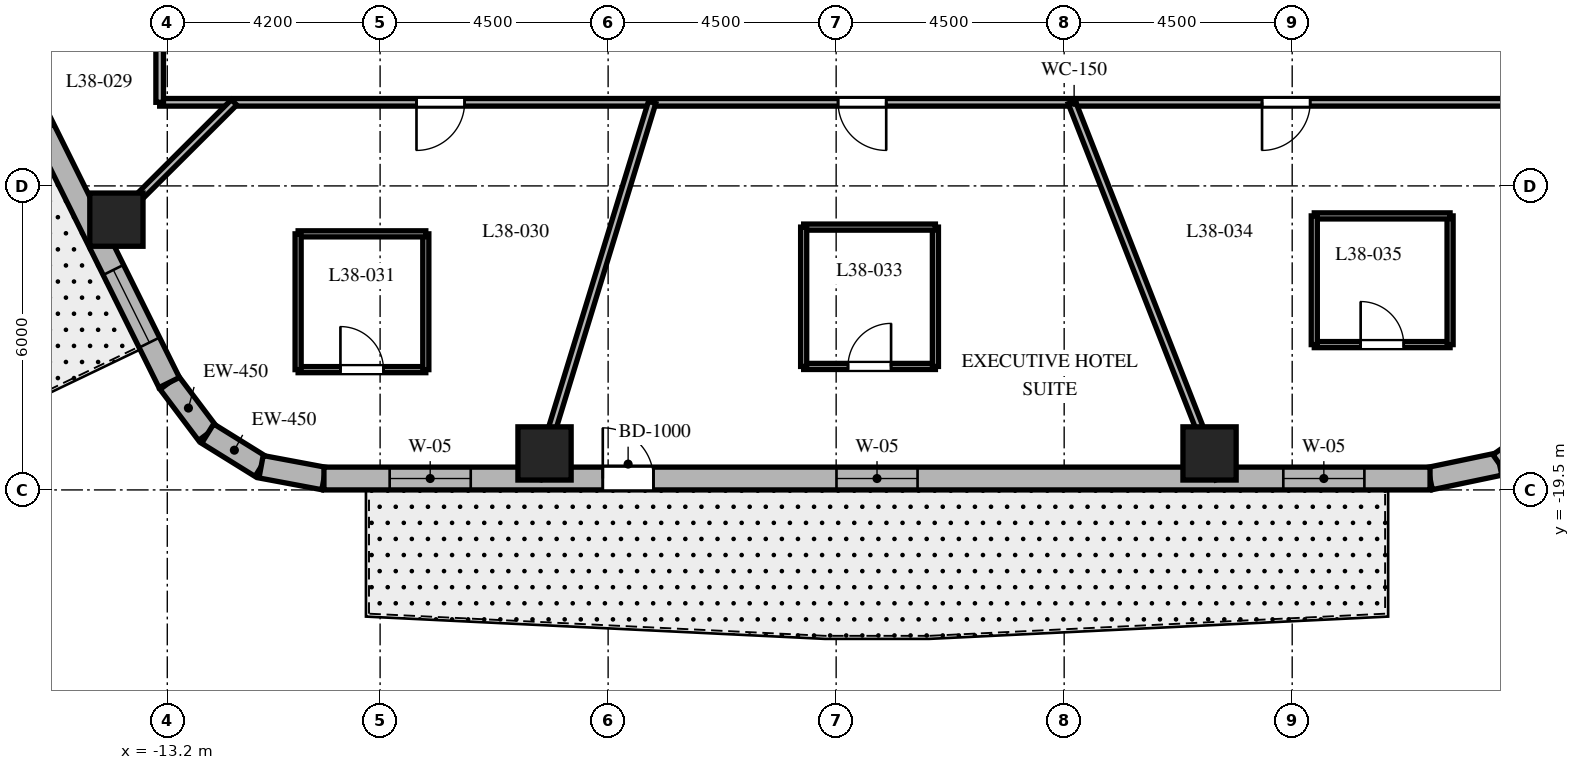
"""IFC4 building model, lengths in metres.
Left out: names, types, materials, properties, quantities, classifications, styles, units other than length and angle.
Written with IfcOpenShell. Run it as: python <this file> out.ifc"""

import sys

from ifc_helpers import new_model, si_unit, direction, frame, frame_2d, origin, origin_2d, place, context, subcontext, project, spatial, rectangle, extrude, element, fill, save


model = new_model("IFC4")
c1 = context("Model", 3, precision=1e-05, world=origin(), true_north=direction((0.0, 1.0)))
c2 = subcontext(c1, "Body", "Model", "MODEL_VIEW")
j1 = project(units=[si_unit("LENGTHUNIT", "METRE"), si_unit("PLANEANGLEUNIT", "RADIAN")], contexts=[c1])
p1 = place(None, origin())
s1 = spatial("IfcSite", under=j1, at=p1, CompositionType="ELEMENT")
p2 = place(p1, origin())
s2 = spatial("IfcBuilding", under=s1, at=p2, CompositionType="ELEMENT")
p3 = place(p2, frame((0.0, 0.0, 155.4)))
s3 = spatial("IfcBuildingStorey", under=s2, at=p3, CompositionType="ELEMENT", Elevation=155.4)
for number, where, z_axis, x_axis in (
    (1, (-5.755, -18.78, 0.0), (0.0, 0.0, 1.0), (1.0, 0.0, 0.0)),
    (2, (7.369, -18.78, 0.0), (0.0, 0.0, 1.0), (1.0, 0.0, 0.0)),
    (3, (-14.204, -14.166, 0.0), (0.0, 0.0, 1.0), (1.0, 0.0, 0.0)),
):
    element("IfcColumn", number, at=place(p3, frame(where, z_axis=z_axis, x_axis=x_axis)), inside=s3, PredefinedType="COLUMN", context=c2, shape_type="SweptSolid", body=[
        extrude(rectangle(XDim=1.05, YDim=1.05, at=origin_2d()), origin(), (0.0, 0.0, 1.0), 3.7),
    ])
p4 = place(p3, frame((-13.162, -17.381, 0.0), z_axis=(0.0, 0.0, 1.0), x_axis=(0.601515770517, -0.798860925205, 0.0)))
e4 = element("IfcWall", 4, at=p4, inside=s3, PredefinedType="SOLIDWALL", context=c2, shape_type="SweptSolid", body=[
    extrude(rectangle(XDim=1.262, YDim=0.45, at=frame_2d((0.631, 0.0))), origin(), (0.0, 0.0, 1.0), 3.4),
])
p5 = place(p3, frame((-12.403, -18.389, 0.0), z_axis=(0.0, 0.0, 1.0), x_axis=(0.849795170926, -0.527113049991, 0.0)))
e5 = element("IfcWall", 5, at=p5, inside=s3, PredefinedType="SOLIDWALL", context=c2, shape_type="SweptSolid", body=[
    extrude(rectangle(XDim=1.241, YDim=0.45, at=frame_2d((0.62, 0.0))), origin(), (0.0, 0.0, 1.0), 3.4),
])
p6 = place(p3, frame((-11.349, -19.043, 0.0), z_axis=(0.0, 0.0, 1.0), x_axis=(0.982931267051, -0.183973161772, 0.0)))
e6 = element("IfcWall", 6, at=p6, inside=s3, PredefinedType="SOLIDWALL", context=c2, shape_type="SweptSolid", body=[
    extrude(rectangle(XDim=1.262, YDim=0.45, at=frame_2d((0.631, 0.0))), origin(), (0.0, 0.0, 1.0), 3.4),
])
p7 = place(p3, frame((11.72, -19.275, 0.0), z_axis=(0.0, 0.0, 1.0), x_axis=(0.97893106758, 0.204191001093, 0.0)))
e7 = element("IfcWall", 7, at=p7, inside=s3, PredefinedType="SOLIDWALL", context=c2, shape_type="SweptSolid", body=[
    extrude(rectangle(XDim=1.4, YDim=0.45, at=frame_2d((0.7, 0.0))), origin(), (0.0, 0.0, 1.0), 3.4),
])
p8 = place(p3, frame((13.091, -18.989, 0.0), z_axis=(0.0, 0.0, 1.0), x_axis=(0.815574637848, 0.578651890258, 0.0)))
e8 = element("IfcWall", 8, at=p8, inside=s3, PredefinedType="SOLIDWALL", context=c2, shape_type="SweptSolid", body=[
    extrude(rectangle(XDim=1.377, YDim=0.45, at=frame_2d((0.688, 0.0))), origin(), (0.0, 0.0, 1.0), 3.4),
])
p9 = place(p3, frame((-10.108, -19.275, 0.0), z_axis=(0.0, 0.0, 1.0), x_axis=(1.0, 0.0, 0.0)))
e9 = element("IfcWall", 9, at=p9, inside=s3, PredefinedType="SOLIDWALL", context=c2, shape_type="SweptSolid", body=[
    extrude(rectangle(XDim=21.829, YDim=0.45, at=frame_2d((10.915, 0.0))), origin(), (0.0, 0.0, 1.0), 3.4),
])
p10 = place(p9, frame((5.503, 0.0, 0.0)))
e10 = element("IfcOpeningElement", 10, at=p10, cuts=e9, PredefinedType="OPENING", context=c2, shape_type="SweptSolid", body=[
    extrude(rectangle(XDim=1.0, YDim=2.15, at=frame_2d((0.5, 1.075))), frame((0.0, 0.235, 0.0), z_axis=(0.0, -1.0, 0.0), x_axis=(1.0, 0.0, 0.0)), (0.0, 0.0, 1.0), 0.47),
])
p11 = place(p9, frame((1.297, 0.0, 0.8)))
e11 = element("IfcOpeningElement", 11, at=p11, cuts=e9, PredefinedType="OPENING", context=c2, shape_type="SweptSolid", body=[
    extrude(rectangle(XDim=1.6, YDim=1.75, at=frame_2d((0.8, 0.875))), frame((0.0, 0.235, 0.0), z_axis=(0.0, -1.0, 0.0), x_axis=(1.0, 0.0, 0.0)), (0.0, 0.0, 1.0), 0.47),
])
p12 = place(p9, frame((10.115, 0.0, 0.8)))
e12 = element("IfcOpeningElement", 12, at=p12, cuts=e9, PredefinedType="OPENING", context=c2, shape_type="SweptSolid", body=[
    extrude(rectangle(XDim=1.6, YDim=1.75, at=frame_2d((0.8, 0.875))), frame((0.0, 0.235, 0.0), z_axis=(0.0, -1.0, 0.0), x_axis=(1.0, 0.0, 0.0)), (0.0, 0.0, 1.0), 0.47),
])
p13 = place(p9, frame((18.933, 0.0, 0.8)))
e13 = element("IfcOpeningElement", 13, at=p13, cuts=e9, PredefinedType="OPENING", context=c2, shape_type="SweptSolid", body=[
    extrude(rectangle(XDim=1.6, YDim=1.75, at=frame_2d((0.8, 0.875))), frame((0.0, 0.235, 0.0), z_axis=(0.0, -1.0, 0.0), x_axis=(1.0, 0.0, 0.0)), (0.0, 0.0, 1.0), 0.47),
])
p14 = place(p3, frame((-20.618, -2.344, 0.0), z_axis=(0.0, 0.0, 1.0), x_axis=(0.444243691097, -0.895905990002, 0.0)))
e14 = element("IfcWall", 14, at=p14, inside=s3, PredefinedType="SOLIDWALL", context=c2, shape_type="SweptSolid", body=[
    extrude(rectangle(XDim=16.784, YDim=0.45, at=frame_2d((8.392, 0.0))), origin(), (0.0, 0.0, 1.0), 3.4),
])
p15 = place(p14, frame((4.535, 0.0, 0.0)))
e15 = element("IfcOpeningElement", 15, at=p15, cuts=e14, PredefinedType="OPENING", context=c2, shape_type="SweptSolid", body=[
    extrude(rectangle(XDim=0.95, YDim=2.15, at=frame_2d((0.475, 1.075))), frame((0.0, 0.235, 0.0), z_axis=(0.0, -1.0, 0.0), x_axis=(1.0, 0.0, 0.0)), (0.0, 0.0, 1.0), 0.47),
])
p16 = place(p14, frame((0.931, 0.0, 0.8)))
e16 = element("IfcOpeningElement", 16, at=p16, cuts=e14, PredefinedType="OPENING", context=c2, shape_type="SweptSolid", body=[
    extrude(rectangle(XDim=1.6, YDim=1.75, at=frame_2d((0.8, 0.875))), frame((0.0, 0.235, 0.0), z_axis=(0.0, -1.0, 0.0), x_axis=(1.0, 0.0, 0.0)), (0.0, 0.0, 1.0), 0.47),
])
p17 = place(p14, frame((5.942, 0.0, 0.8)))
e17 = element("IfcOpeningElement", 17, at=p17, cuts=e14, PredefinedType="OPENING", context=c2, shape_type="SweptSolid", body=[
    extrude(rectangle(XDim=1.0, YDim=1.65, at=frame_2d((0.5, 0.825))), frame((0.0, 0.235, 0.0), z_axis=(0.0, -1.0, 0.0), x_axis=(1.0, 0.0, 0.0)), (0.0, 0.0, 1.0), 0.47),
])
p18 = place(p14, frame((9.633, 0.0, 0.8)))
e18 = element("IfcOpeningElement", 18, at=p18, cuts=e14, PredefinedType="OPENING", context=c2, shape_type="SweptSolid", body=[
    extrude(rectangle(XDim=1.6, YDim=1.75, at=frame_2d((0.8, 0.875))), frame((0.0, 0.235, 0.0), z_axis=(0.0, -1.0, 0.0), x_axis=(1.0, 0.0, 0.0)), (0.0, 0.0, 1.0), 0.47),
])
p19 = place(p14, frame((14.303, 0.0, 0.8)))
e19 = element("IfcOpeningElement", 19, at=p19, cuts=e14, PredefinedType="OPENING", context=c2, shape_type="SweptSolid", body=[
    extrude(rectangle(XDim=1.6, YDim=1.75, at=frame_2d((0.8, 0.875))), frame((0.0, 0.235, 0.0), z_axis=(0.0, -1.0, 0.0), x_axis=(1.0, 0.0, 0.0)), (0.0, 0.0, 1.0), 0.47),
])
p20 = place(p3, frame((13.35, -11.85, 0.0), z_axis=(0.0, 0.0, 1.0), x_axis=(-1.0, 0.0, 0.0)))
e20 = element("IfcWall", 20, at=p20, inside=s3, PredefinedType="PARTITIONING", context=c2, shape_type="SweptSolid", body=[
    extrude(rectangle(XDim=26.7, YDim=0.15, at=frame_2d((13.35, 0.0))), origin(), (0.0, 0.0, 1.0), 2.84),
])
p21 = place(p20, frame((20.682, 0.0, 0.0)))
e21 = element("IfcOpeningElement", 21, at=p21, cuts=e20, PredefinedType="OPENING", context=c2, shape_type="SweptSolid", body=[
    extrude(rectangle(XDim=0.95, YDim=2.03, at=frame_2d((0.475, 1.015))), frame((0.0, 0.085, 0.0), z_axis=(0.0, -1.0, 0.0), x_axis=(1.0, 0.0, 0.0)), (0.0, 0.0, 1.0), 0.17),
])
p22 = place(p20, frame((12.362, 0.0, 0.0)))
e22 = element("IfcOpeningElement", 22, at=p22, cuts=e20, PredefinedType="OPENING", context=c2, shape_type="SweptSolid", body=[
    extrude(rectangle(XDim=0.95, YDim=2.03, at=frame_2d((0.475, 1.015))), frame((0.0, 0.085, 0.0), z_axis=(0.0, -1.0, 0.0), x_axis=(1.0, 0.0, 0.0)), (0.0, 0.0, 1.0), 0.17),
])
p23 = place(p20, frame((3.995, 0.0, 0.0)))
e23 = element("IfcOpeningElement", 23, at=p23, cuts=e20, PredefinedType="OPENING", context=c2, shape_type="SweptSolid", body=[
    extrude(rectangle(XDim=0.95, YDim=2.03, at=frame_2d((0.475, 1.015))), frame((0.0, 0.085, 0.0), z_axis=(0.0, -1.0, 0.0), x_axis=(1.0, 0.0, 0.0)), (0.0, 0.0, 1.0), 0.17),
])
p24 = place(p3, frame((-13.35, -11.85, 0.0), z_axis=(0.0, 0.0, 1.0), x_axis=(0.0, 1.0, 0.0)))
e24 = element("IfcWall", 24, at=p24, inside=s3, PredefinedType="PARTITIONING", context=c2, shape_type="SweptSolid", body=[
    extrude(rectangle(XDim=23.7, YDim=0.15, at=frame_2d((11.85, 0.0))), origin(), (0.0, 0.0, 1.0), 2.84),
])
p25 = place(p24, frame((18.389, 0.0, 0.0)))
e25 = element("IfcOpeningElement", 25, at=p25, cuts=e24, PredefinedType="OPENING", context=c2, shape_type="SweptSolid", body=[
    extrude(rectangle(XDim=0.95, YDim=2.03, at=frame_2d((0.475, 1.015))), frame((0.0, 0.085, 0.0), z_axis=(0.0, -1.0, 0.0), x_axis=(1.0, 0.0, 0.0)), (0.0, 0.0, 1.0), 0.17),
])
p26 = place(p24, frame((10.751, 0.0, 0.0)))
e26 = element("IfcOpeningElement", 26, at=p26, cuts=e24, PredefinedType="OPENING", context=c2, shape_type="SweptSolid", body=[
    extrude(rectangle(XDim=0.95, YDim=2.03, at=frame_2d((0.475, 1.015))), frame((0.0, 0.085, 0.0), z_axis=(0.0, -1.0, 0.0), x_axis=(1.0, 0.0, 0.0)), (0.0, 0.0, 1.0), 0.17),
])
p27 = place(p24, frame((5.951, 0.0, 0.0)))
e27 = element("IfcOpeningElement", 27, at=p27, cuts=e24, PredefinedType="OPENING", context=c2, shape_type="SweptSolid", body=[
    extrude(rectangle(XDim=0.9, YDim=2.03, at=frame_2d((0.45, 1.015))), frame((0.0, 0.085, 0.0), z_axis=(0.0, -1.0, 0.0), x_axis=(1.0, 0.0, 0.0)), (0.0, 0.0, 1.0), 0.17),
])
p28 = place(p24, frame((1.993, 0.0, 0.0)))
e28 = element("IfcOpeningElement", 28, at=p28, cuts=e24, PredefinedType="OPENING", context=c2, shape_type="SweptSolid", body=[
    extrude(rectangle(XDim=0.9, YDim=2.03, at=frame_2d((0.45, 1.015))), frame((0.0, 0.085, 0.0), z_axis=(0.0, -1.0, 0.0), x_axis=(1.0, 0.0, 0.0)), (0.0, 0.0, 1.0), 0.17),
])
p29 = place(p3, frame((-11.882, -11.85, 0.0), z_axis=(0.0, 0.0, 1.0), x_axis=(-0.708037373639, -0.706174962407, 0.0)))
e29 = element("IfcWall", 29, at=p29, inside=s3, PredefinedType="PARTITIONING", context=c2, shape_type="SweptSolid", body=[
    extrude(rectangle(XDim=3.802, YDim=0.15, at=frame_2d((1.901, 0.0))), origin(), (0.0, 0.0, 1.0), 2.64),
])
p30 = place(p3, frame((-3.631, -11.85, 0.0), z_axis=(0.0, 0.0, 1.0), x_axis=(-0.293007573338, -0.956110120209, 0.0)))
e30 = element("IfcWall", 30, at=p30, inside=s3, PredefinedType="PARTITIONING", context=c2, shape_type="SweptSolid", body=[
    extrude(rectangle(XDim=7.766, YDim=0.15, at=frame_2d((3.883, 0.0))), origin(), (0.0, 0.0, 1.0), 2.64),
])
p31 = place(p3, frame((4.65, -11.85, 0.0), z_axis=(0.0, 0.0, 1.0), x_axis=(0.365265947993, -0.930903210456, 0.0)))
e31 = element("IfcWall", 31, at=p31, inside=s3, PredefinedType="PARTITIONING", context=c2, shape_type="SweptSolid", body=[
    extrude(rectangle(XDim=7.976, YDim=0.15, at=frame_2d((3.988, 0.0))), origin(), (0.0, 0.0, 1.0), 2.64),
])
p32 = place(p3, frame((-10.618, -17.126, 0.0), z_axis=(0.0, 0.0, 1.0), x_axis=(1.0, 0.0, 0.0)))
e32 = element("IfcWall", 32, at=p32, inside=s3, PredefinedType="PARTITIONING", context=c2, shape_type="SweptSolid", body=[
    extrude(rectangle(XDim=2.52, YDim=0.12, at=frame_2d((1.26, 0.0))), origin(), (0.0, 0.0, 1.0), 2.64),
])
p33 = place(p32, frame((0.835, 0.0, 0.0)))
e33 = element("IfcOpeningElement", 33, at=p33, cuts=e32, PredefinedType="OPENING", context=c2, shape_type="SweptSolid", body=[
    extrude(rectangle(XDim=0.85, YDim=2.03, at=frame_2d((0.425, 1.015))), frame((0.0, 0.07, 0.0), z_axis=(0.0, -1.0, 0.0), x_axis=(1.0, 0.0, 0.0)), (0.0, 0.0, 1.0), 0.14),
])
p34 = place(p3, frame((-8.098, -17.126, 0.0), z_axis=(0.0, 0.0, 1.0), x_axis=(0.0, 1.0, 0.0)))
e34 = element("IfcWall", 34, at=p34, inside=s3, PredefinedType="PARTITIONING", context=c2, shape_type="SweptSolid", body=[
    extrude(rectangle(XDim=2.68, YDim=0.12, at=frame_2d((1.34, 0.0))), origin(), (0.0, 0.0, 1.0), 3.4),
])
p35 = place(p3, frame((-8.098, -14.446, 0.0), z_axis=(0.0, 0.0, 1.0), x_axis=(-1.0, 0.0, 0.0)))
e35 = element("IfcWall", 35, at=p35, inside=s3, PredefinedType="PARTITIONING", context=c2, shape_type="SweptSolid", body=[
    extrude(rectangle(XDim=2.52, YDim=0.12, at=frame_2d((1.26, 0.0))), origin(), (0.0, 0.0, 1.0), 3.4),
])
p36 = place(p3, frame((-10.618, -14.446, 0.0), z_axis=(0.0, 0.0, 1.0), x_axis=(0.0, -1.0, 0.0)))
e36 = element("IfcWall", 36, at=p36, inside=s3, PredefinedType="PARTITIONING", context=c2, shape_type="SweptSolid", body=[
    extrude(rectangle(XDim=2.68, YDim=0.12, at=frame_2d((1.34, 0.0))), origin(), (0.0, 0.0, 1.0), 2.64),
])
p37 = place(p3, frame((-0.641, -17.063, 0.0), z_axis=(0.0, 0.0, 1.0), x_axis=(1.0, 0.0, 0.0)))
e37 = element("IfcWall", 37, at=p37, inside=s3, PredefinedType="PARTITIONING", context=c2, shape_type="SweptSolid", body=[
    extrude(rectangle(XDim=2.6, YDim=0.12, at=frame_2d((1.3, 0.0))), origin(), (0.0, 0.0, 1.0), 3.4),
])
p38 = place(p37, frame((0.875, 0.0, 0.0)))
e38 = element("IfcOpeningElement", 38, at=p38, cuts=e37, PredefinedType="OPENING", context=c2, shape_type="SweptSolid", body=[
    extrude(rectangle(XDim=0.85, YDim=2.03, at=frame_2d((0.425, 1.015))), frame((0.0, 0.07, 0.0), z_axis=(0.0, -1.0, 0.0), x_axis=(1.0, 0.0, 0.0)), (0.0, 0.0, 1.0), 0.14),
])
p39 = place(p3, frame((1.959, -17.063, 0.0), z_axis=(0.0, 0.0, 1.0), x_axis=(0.0, 1.0, 0.0)))
e39 = element("IfcWall", 39, at=p39, inside=s3, PredefinedType="PARTITIONING", context=c2, shape_type="SweptSolid", body=[
    extrude(rectangle(XDim=2.75, YDim=0.12, at=frame_2d((1.375, 0.0))), origin(), (0.0, 0.0, 1.0), 2.841),
])
p40 = place(p3, frame((1.959, -14.313, 0.0), z_axis=(0.0, 0.0, 1.0), x_axis=(-1.0, 0.0, 0.0)))
e40 = element("IfcWall", 40, at=p40, inside=s3, PredefinedType="PARTITIONING", context=c2, shape_type="SweptSolid", body=[
    extrude(rectangle(XDim=2.6, YDim=0.12, at=frame_2d((1.3, 0.0))), origin(), (0.0, 0.0, 1.0), 3.4),
])
p41 = place(p3, frame((-0.641, -14.313, 0.0), z_axis=(0.0, 0.0, 1.0), x_axis=(0.0, -1.0, 0.0)))
e41 = element("IfcWall", 41, at=p41, inside=s3, PredefinedType="PARTITIONING", context=c2, shape_type="SweptSolid", body=[
    extrude(rectangle(XDim=2.75, YDim=0.12, at=frame_2d((1.375, 0.0))), origin(), (0.0, 0.0, 1.0), 2.841),
])
p42 = place(p3, frame((9.436, -16.632, 0.0), z_axis=(0.0, 0.0, 1.0), x_axis=(1.0, 0.0, 0.0)))
e42 = element("IfcWall", 42, at=p42, inside=s3, PredefinedType="PARTITIONING", context=c2, shape_type="SweptSolid", body=[
    extrude(rectangle(XDim=2.68, YDim=0.12, at=frame_2d((1.34, 0.0))), origin(), (0.0, 0.0, 1.0), 2.64),
])
p43 = place(p42, frame((0.915, 0.0, 0.0)))
e43 = element("IfcOpeningElement", 43, at=p43, cuts=e42, PredefinedType="OPENING", context=c2, shape_type="SweptSolid", body=[
    extrude(rectangle(XDim=0.85, YDim=2.03, at=frame_2d((0.425, 1.015))), frame((0.0, 0.07, 0.0), z_axis=(0.0, -1.0, 0.0), x_axis=(1.0, 0.0, 0.0)), (0.0, 0.0, 1.0), 0.14),
])
p44 = place(p3, frame((12.116, -16.632, 0.0), z_axis=(0.0, 0.0, 1.0), x_axis=(0.0, 1.0, 0.0)))
e44 = element("IfcWall", 44, at=p44, inside=s3, PredefinedType="PARTITIONING", context=c2, shape_type="SweptSolid", body=[
    extrude(rectangle(XDim=2.54, YDim=0.12, at=frame_2d((1.27, 0.0))), origin(), (0.0, 0.0, 1.0), 2.64),
])
p45 = place(p3, frame((12.116, -14.092, 0.0), z_axis=(0.0, 0.0, 1.0), x_axis=(-1.0, 0.0, 0.0)))
e45 = element("IfcWall", 45, at=p45, inside=s3, PredefinedType="PARTITIONING", context=c2, shape_type="SweptSolid", body=[
    extrude(rectangle(XDim=2.68, YDim=0.12, at=frame_2d((1.34, 0.0))), origin(), (0.0, 0.0, 1.0), 2.927),
])
p46 = place(p3, frame((9.436, -14.092, 0.0), z_axis=(0.0, 0.0, 1.0), x_axis=(0.0, -1.0, 0.0)))
e46 = element("IfcWall", 46, at=p46, inside=s3, PredefinedType="PARTITIONING", context=c2, shape_type="SweptSolid", body=[
    extrude(rectangle(XDim=2.54, YDim=0.12, at=frame_2d((1.27, 0.0))), origin(), (0.0, 0.0, 1.0), 2.927),
])
p47 = place(p10, origin())
e47 = element("IfcDoor", 47, at=p47, inside=s3, OperationType="SINGLE_SWING_LEFT", PredefinedType="DOOR", context=c2, shape_type="SweptSolid", body=[
    extrude(rectangle(XDim=1.0, YDim=2.15, at=frame_2d((0.5, 1.075))), frame((0.0, 0.025, 0.0), z_axis=(0.0, -1.0, 0.0), x_axis=(1.0, 0.0, 0.0)), (0.0, 0.0, 1.0), 0.05),
])
fill(e10, e47)
p48 = place(p11, origin())
e48 = element("IfcWindow", 48, at=p48, inside=s3, PartitioningType="SINGLE_PANEL", PredefinedType="WINDOW", context=c2, shape_type="SweptSolid", body=[
    extrude(rectangle(XDim=1.6, YDim=1.75, at=frame_2d((0.8, 0.875))), frame((0.0, 0.03, 0.0), z_axis=(0.0, -1.0, 0.0), x_axis=(1.0, 0.0, 0.0)), (0.0, 0.0, 1.0), 0.06),
])
fill(e11, e48)
p49 = place(p12, origin())
e49 = element("IfcWindow", 49, at=p49, inside=s3, PartitioningType="SINGLE_PANEL", PredefinedType="WINDOW", context=c2, shape_type="SweptSolid", body=[
    extrude(rectangle(XDim=1.6, YDim=1.75, at=frame_2d((0.8, 0.875))), frame((0.0, 0.03, 0.0), z_axis=(0.0, -1.0, 0.0), x_axis=(1.0, 0.0, 0.0)), (0.0, 0.0, 1.0), 0.06),
])
fill(e12, e49)
p50 = place(p13, origin())
e50 = element("IfcWindow", 50, at=p50, inside=s3, PartitioningType="SINGLE_PANEL", PredefinedType="WINDOW", context=c2, shape_type="SweptSolid", body=[
    extrude(rectangle(XDim=1.6, YDim=1.75, at=frame_2d((0.8, 0.875))), frame((0.0, 0.03, 0.0), z_axis=(0.0, -1.0, 0.0), x_axis=(1.0, 0.0, 0.0)), (0.0, 0.0, 1.0), 0.06),
])
fill(e13, e50)
p51 = place(p19, origin())
e51 = element("IfcWindow", 51, at=p51, inside=s3, PartitioningType="SINGLE_PANEL", PredefinedType="WINDOW", context=c2, shape_type="SweptSolid", body=[
    extrude(rectangle(XDim=1.6, YDim=1.75, at=frame_2d((0.8, 0.875))), frame((0.0, 0.03, 0.0), z_axis=(0.0, -1.0, 0.0), x_axis=(1.0, 0.0, 0.0)), (0.0, 0.0, 1.0), 0.06),
])
fill(e19, e51)
p52 = place(p21, origin())
e52 = element("IfcDoor", 52, at=p52, inside=s3, OperationType="SINGLE_SWING_RIGHT", PredefinedType="DOOR", context=c2, shape_type="SweptSolid", body=[
    extrude(rectangle(XDim=0.95, YDim=2.03, at=frame_2d((0.475, 1.015))), frame((0.0, 0.025, 0.0), z_axis=(0.0, -1.0, 0.0), x_axis=(1.0, 0.0, 0.0)), (0.0, 0.0, 1.0), 0.05),
])
fill(e21, e52)
p53 = place(p33, origin())
e53 = element("IfcDoor", 53, at=p53, inside=s3, OperationType="SINGLE_SWING_LEFT", PredefinedType="DOOR", context=c2, shape_type="SweptSolid", body=[
    extrude(rectangle(XDim=0.85, YDim=2.03, at=frame_2d((0.425, 1.015))), frame((0.0, 0.025, 0.0), z_axis=(0.0, -1.0, 0.0), x_axis=(1.0, 0.0, 0.0)), (0.0, 0.0, 1.0), 0.05),
])
fill(e33, e53)
p54 = place(p22, origin())
e54 = element("IfcDoor", 54, at=p54, inside=s3, OperationType="SINGLE_SWING_LEFT", PredefinedType="DOOR", context=c2, shape_type="SweptSolid", body=[
    extrude(rectangle(XDim=0.95, YDim=2.03, at=frame_2d((0.475, 1.015))), frame((0.0, 0.025, 0.0), z_axis=(0.0, -1.0, 0.0), x_axis=(1.0, 0.0, 0.0)), (0.0, 0.0, 1.0), 0.05),
])
fill(e22, e54)
p55 = place(p38, origin())
e55 = element("IfcDoor", 55, at=p55, inside=s3, OperationType="SINGLE_SWING_RIGHT", PredefinedType="DOOR", context=c2, shape_type="SweptSolid", body=[
    extrude(rectangle(XDim=0.85, YDim=2.03, at=frame_2d((0.425, 1.015))), frame((0.0, 0.025, 0.0), z_axis=(0.0, -1.0, 0.0), x_axis=(1.0, 0.0, 0.0)), (0.0, 0.0, 1.0), 0.05),
])
fill(e38, e55)
p56 = place(p23, origin())
e56 = element("IfcDoor", 56, at=p56, inside=s3, OperationType="SINGLE_SWING_RIGHT", PredefinedType="DOOR", context=c2, shape_type="SweptSolid", body=[
    extrude(rectangle(XDim=0.95, YDim=2.03, at=frame_2d((0.475, 1.015))), frame((0.0, 0.025, 0.0), z_axis=(0.0, -1.0, 0.0), x_axis=(1.0, 0.0, 0.0)), (0.0, 0.0, 1.0), 0.05),
])
fill(e23, e56)
p57 = place(p43, origin())
e57 = element("IfcDoor", 57, at=p57, inside=s3, OperationType="SINGLE_SWING_LEFT", PredefinedType="DOOR", context=c2, shape_type="SweptSolid", body=[
    extrude(rectangle(XDim=0.85, YDim=2.03, at=frame_2d((0.425, 1.015))), frame((0.0, 0.025, 0.0), z_axis=(0.0, -1.0, 0.0), x_axis=(1.0, 0.0, 0.0)), (0.0, 0.0, 1.0), 0.05),
])
fill(e43, e57)
save(model, sys.argv[1])
